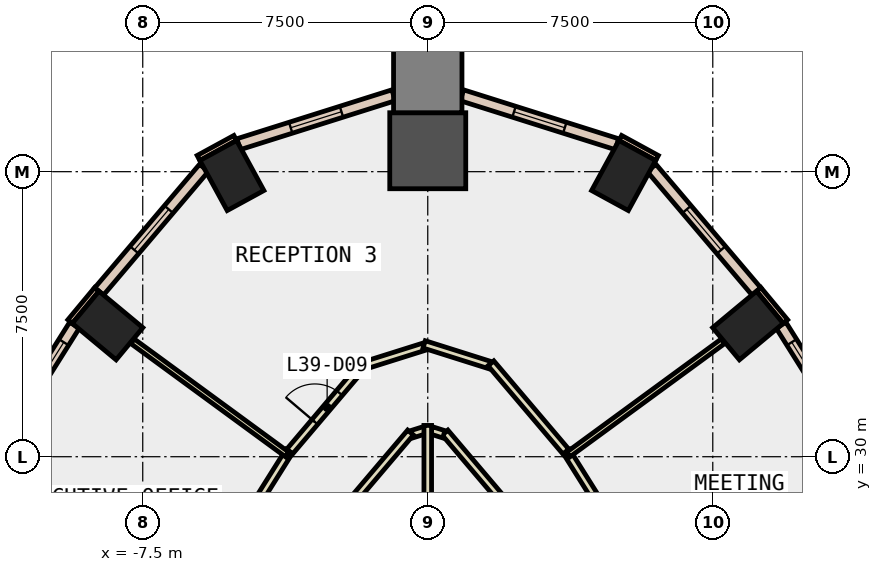
"""IFC4 building model, lengths in metres.
Left out: names, types, materials, properties, quantities, classifications, styles, units other than length and angle.
Written with IfcOpenShell. Run it as: python <this file> out.ifc"""

import sys

from ifc_helpers import new_model, si_unit, direction, frame, frame_2d, origin, origin_2d, place, context, subcontext, project, spatial, rectangle, extrude, element, fill, save


model = new_model("IFC4")
c1 = context("Model", 3, precision=1e-05, world=origin(), true_north=direction((0.0, 1.0)))
c2 = subcontext(c1, "Body", "Model", "MODEL_VIEW")
j1 = project(units=[si_unit("LENGTHUNIT", "METRE"), si_unit("PLANEANGLEUNIT", "RADIAN")], contexts=[c1])
p1 = place(None, origin())
s1 = spatial("IfcSite", under=j1, at=p1, CompositionType="ELEMENT")
p2 = place(p1, origin())
s2 = spatial("IfcBuilding", under=s1, at=p2, CompositionType="ELEMENT")
p3 = place(p2, frame((0.0, 0.0, 176.0)))
s3 = spatial("IfcBuildingStorey", under=s2, at=p3, CompositionType="ELEMENT", Elevation=176.0)
for number, where, z_axis, x_axis in (
    (1, (8.426, 33.452, -0.4), (0.0, 0.0, 1.0), (-0.639, 0.769, 0.0)),
    (2, (5.154, 37.399, -0.4), (0.0, 0.0, 1.0), (-0.878, 0.479, 0.0)),
):
    element("IfcColumn", number, at=place(p3, frame(where, z_axis=z_axis, x_axis=x_axis)), inside=s3, PredefinedType="COLUMN", context=c2, shape_type="SweptSolid", body=[
        extrude(rectangle(XDim=1.1, YDim=1.5, at=origin_2d()), origin(), (0.0, 0.0, 1.0), 4.2),
    ])
p4 = place(p3, frame((0.0, 38.051, -0.4), z_axis=(0.0, 0.0, 1.0), x_axis=(0.0, 1.0, 0.0)))
e3 = element("IfcColumn", 3, at=p4, inside=s3, PredefinedType="COLUMN", context=c2, shape_type="SweptSolid", body=[
    extrude(rectangle(XDim=2.0, YDim=2.0, at=origin_2d()), origin(), (0.0, 0.0, 1.0), 4.2),
])
for number, where, z_axis, x_axis in (
    (4, (-5.154, 37.399, -0.4), (0.0, 0.0, 1.0), (0.878, 0.479, 0.0)),
    (5, (-8.426, 33.452, -0.4), (0.0, 0.0, 1.0), (0.639, 0.769, 0.0)),
):
    element("IfcColumn", number, at=place(p3, frame(where, z_axis=z_axis, x_axis=x_axis)), inside=s3, PredefinedType="COLUMN", context=c2, shape_type="SweptSolid", body=[
        extrude(rectangle(XDim=1.1, YDim=1.5, at=origin_2d()), origin(), (0.0, 0.0, 1.0), 4.2),
    ])
p5 = place(p3, frame((0.0, 39.951, -0.4), z_axis=(0.0, 0.0, 1.0), x_axis=(0.0, 1.0, 0.0)))
e6 = element("IfcColumn", 6, at=p5, inside=s3, PredefinedType="COLUMN", context=c2, shape_type="SweptSolid", body=[
    extrude(rectangle(XDim=1.8, YDim=1.8, at=origin_2d()), origin(), (0.0, 0.0, 1.0), 4.2),
])
for number, where, z_axis, x_axis in (
    (7, (6.032, 37.86, 0.0), (0.0, 0.0, 1.0), (-0.878, 0.479, 0.0)),
    (8, (-5.066, 38.387, 0.0), (0.0, 0.0, 1.0), (-0.878, -0.479, 0.0)),
):
    element("IfcWall", number, at=place(p3, frame(where, z_axis=z_axis, x_axis=x_axis)), inside=s3, PredefinedType="STANDARD", context=c2, shape_type="SweptSolid", body=[
        extrude(rectangle(XDim=1.1, YDim=0.15, at=frame_2d((0.55, 0.0))), origin(), (0.0, 0.0, 1.0), 3.8),
    ])
for number, where, z_axis, x_axis in (
    (9, (9.412, 33.556, 0.0), (0.0, 0.0, 1.0), (-0.639, 0.769, 0.0)),
    (10, (-8.709, 34.402, 0.0), (0.0, 0.0, 1.0), (-0.639, -0.769, 0.0)),
):
    element("IfcWall", number, at=place(p3, frame(where, z_axis=z_axis, x_axis=x_axis)), inside=s3, PredefinedType="STANDARD", context=c2, shape_type="SweptSolid", body=[
        extrude(rectangle(XDim=1.1, YDim=0.15, at=frame_2d((0.55, 0.0))), origin(), (0.0, 0.0, 1.0), 3.8),
    ])
p6 = place(p3, frame((12.55, 28.279, 0.0), z_axis=(0.0, 0.0, 1.0), x_axis=(-0.531816047834, 0.846859900613, 0.0)))
e11 = element("IfcWall", 11, at=p6, inside=s3, PredefinedType="STANDARD", context=c2, shape_type="SweptSolid", body=[
    extrude(rectangle(XDim=6.119, YDim=0.3, at=frame_2d((3.06, 0.0))), origin(), (0.0, 0.0, 1.0), 3.8),
])
p7 = place(p6, frame((0.53, 0.0, 0.9)))
e12 = element("IfcOpeningElement", 12, at=p7, cuts=e11, PredefinedType="OPENING", context=c2, shape_type="SweptSolid", body=[
    extrude(rectangle(XDim=2.0, YDim=2.6, at=frame_2d((1.0, 1.3))), frame((0.0, 0.16, 0.0), z_axis=(0.0, -1.0, 0.0), x_axis=(1.0, 0.0, 0.0)), (0.0, 0.0, 1.0), 0.32),
])
p8 = place(p6, frame((3.589, 0.0, 0.9)))
e13 = element("IfcOpeningElement", 13, at=p8, cuts=e11, PredefinedType="OPENING", context=c2, shape_type="SweptSolid", body=[
    extrude(rectangle(XDim=2.0, YDim=2.6, at=frame_2d((1.0, 1.3))), frame((0.0, 0.16, 0.0), z_axis=(0.0, -1.0, 0.0), x_axis=(1.0, 0.0, 0.0)), (0.0, 0.0, 1.0), 0.32),
])
p9 = place(p3, frame((8.647, 34.35, 0.0), z_axis=(0.0, 0.0, 1.0), x_axis=(-0.647156077277, 0.76235753531, 0.0)))
e14 = element("IfcWall", 14, at=p9, inside=s3, PredefinedType="STANDARD", context=c2, shape_type="SweptSolid", body=[
    extrude(rectangle(XDim=4.262, YDim=0.3, at=frame_2d((2.131, 0.0))), origin(), (0.0, 0.0, 1.0), 3.8),
])
p10 = place(p9, frame((1.431, 0.0, 0.9)))
e15 = element("IfcOpeningElement", 15, at=p10, cuts=e14, PredefinedType="OPENING", context=c2, shape_type="SweptSolid", body=[
    extrude(rectangle(XDim=1.4, YDim=2.6, at=frame_2d((0.7, 1.3))), frame((0.0, 0.16, 0.0), z_axis=(0.0, -1.0, 0.0), x_axis=(1.0, 0.0, 0.0)), (0.0, 0.0, 1.0), 0.32),
])
p11 = place(p3, frame((4.978, 38.223, 0.0), z_axis=(0.0, 0.0, 1.0), x_axis=(-0.953651650729, 0.300912826349, 0.0)))
e16 = element("IfcWall", 16, at=p11, inside=s3, PredefinedType="STANDARD", context=c2, shape_type="SweptSolid", body=[
    extrude(rectangle(XDim=4.277, YDim=0.3, at=frame_2d((2.139, 0.0))), origin(), (0.0, 0.0, 1.0), 3.8),
])
p12 = place(p11, frame((1.439, 0.0, 0.9)))
e17 = element("IfcOpeningElement", 17, at=p12, cuts=e16, PredefinedType="OPENING", context=c2, shape_type="SweptSolid", body=[
    extrude(rectangle(XDim=1.4, YDim=2.6, at=frame_2d((0.7, 1.3))), frame((0.0, 0.16, 0.0), z_axis=(0.0, -1.0, 0.0), x_axis=(1.0, 0.0, 0.0)), (0.0, 0.0, 1.0), 0.32),
])
p13 = place(p3, frame((-0.899, 39.51, 0.0), z_axis=(0.0, 0.0, 1.0), x_axis=(-0.953651650729, -0.300912826349, 0.0)))
e18 = element("IfcWall", 18, at=p13, inside=s3, PredefinedType="STANDARD", context=c2, shape_type="SweptSolid", body=[
    extrude(rectangle(XDim=4.277, YDim=0.3, at=frame_2d((2.139, 0.0))), origin(), (0.0, 0.0, 1.0), 3.8),
])
p14 = place(p13, frame((1.439, 0.0, 0.9)))
e19 = element("IfcOpeningElement", 19, at=p14, cuts=e18, PredefinedType="OPENING", context=c2, shape_type="SweptSolid", body=[
    extrude(rectangle(XDim=1.4, YDim=2.6, at=frame_2d((0.7, 1.3))), frame((0.0, 0.16, 0.0), z_axis=(0.0, -1.0, 0.0), x_axis=(1.0, 0.0, 0.0)), (0.0, 0.0, 1.0), 0.32),
])
p15 = place(p3, frame((-5.889, 37.599, 0.0), z_axis=(0.0, 0.0, 1.0), x_axis=(-0.647156077277, -0.76235753531, 0.0)))
e20 = element("IfcWall", 20, at=p15, inside=s3, PredefinedType="STANDARD", context=c2, shape_type="SweptSolid", body=[
    extrude(rectangle(XDim=4.262, YDim=0.3, at=frame_2d((2.131, 0.0))), origin(), (0.0, 0.0, 1.0), 3.8),
])
p16 = place(p15, frame((1.431, 0.0, 0.9)))
e21 = element("IfcOpeningElement", 21, at=p16, cuts=e20, PredefinedType="OPENING", context=c2, shape_type="SweptSolid", body=[
    extrude(rectangle(XDim=1.4, YDim=2.6, at=frame_2d((0.7, 1.3))), frame((0.0, 0.16, 0.0), z_axis=(0.0, -1.0, 0.0), x_axis=(1.0, 0.0, 0.0)), (0.0, 0.0, 1.0), 0.32),
])
p17 = place(p3, frame((-9.296, 33.461, 0.0), z_axis=(0.0, 0.0, 1.0), x_axis=(-0.531816047834, -0.846859900613, 0.0)))
e22 = element("IfcWall", 22, at=p17, inside=s3, PredefinedType="STANDARD", context=c2, shape_type="SweptSolid", body=[
    extrude(rectangle(XDim=6.119, YDim=0.3, at=frame_2d((3.06, 0.0))), origin(), (0.0, 0.0, 1.0), 3.8),
])
p18 = place(p17, frame((0.53, 0.0, 0.9)))
e23 = element("IfcOpeningElement", 23, at=p18, cuts=e22, PredefinedType="OPENING", context=c2, shape_type="SweptSolid", body=[
    extrude(rectangle(XDim=2.0, YDim=2.6, at=frame_2d((1.0, 1.3))), frame((0.0, 0.16, 0.0), z_axis=(0.0, -1.0, 0.0), x_axis=(1.0, 0.0, 0.0)), (0.0, 0.0, 1.0), 0.32),
])
p19 = place(p17, frame((3.589, 0.0, 0.9)))
e24 = element("IfcOpeningElement", 24, at=p19, cuts=e22, PredefinedType="OPENING", context=c2, shape_type="SweptSolid", body=[
    extrude(rectangle(XDim=2.0, YDim=2.6, at=frame_2d((1.0, 1.3))), frame((0.0, 0.16, 0.0), z_axis=(0.0, -1.0, 0.0), x_axis=(1.0, 0.0, 0.0)), (0.0, 0.0, 1.0), 0.32),
])
p20 = place(p3, frame((1.936, 28.89, 0.0), z_axis=(0.0, 0.0, 1.0), x_axis=(-0.647388540773, 0.762160138866, 0.0)))
e25 = element("IfcWall", 25, at=p20, inside=s3, PredefinedType="PARTITIONING", context=c2, shape_type="SweptSolid", body=[
    extrude(rectangle(XDim=2.291, YDim=0.2, at=frame_2d((1.146, 0.0))), origin(), (0.0, 0.0, 1.0), 3.75),
])
p21 = place(p3, frame((0.423, 30.59, 0.0), z_axis=(0.0, 0.0, 1.0), x_axis=(-0.954074901128, 0.29956816092, 0.0)))
e26 = element("IfcWall", 26, at=p21, inside=s3, PredefinedType="PARTITIONING", context=c2, shape_type="SweptSolid", body=[
    extrude(rectangle(XDim=0.344, YDim=0.2, at=frame_2d((0.172, 0.0))), origin(), (0.0, 0.0, 1.0), 3.75),
])
p22 = place(p3, frame((-0.048, 30.708, 0.0), z_axis=(0.0, 0.0, 1.0), x_axis=(-0.953948026088, -0.299971937891, 0.0)))
e27 = element("IfcWall", 27, at=p22, inside=s3, PredefinedType="PARTITIONING", context=c2, shape_type="SweptSolid", body=[
    extrude(rectangle(XDim=0.393, YDim=0.2, at=frame_2d((0.197, 0.0))), origin(), (0.0, 0.0, 1.0), 3.75),
])
p23 = place(p3, frame((-0.453, 30.636, 0.0), z_axis=(0.0, 0.0, 1.0), x_axis=(-0.647388540773, -0.762160138866, 0.0)))
e28 = element("IfcWall", 28, at=p23, inside=s3, PredefinedType="PARTITIONING", context=c2, shape_type="SweptSolid", body=[
    extrude(rectangle(XDim=2.291, YDim=0.2, at=frame_2d((1.146, 0.0))), origin(), (0.0, 0.0, 1.0), 3.75),
])
p24 = place(p3, frame((3.646, 30.142, 0.0), z_axis=(0.0, 0.0, 1.0), x_axis=(0.531621424046, -0.846982090422, 0.0)))
e29 = element("IfcWall", 29, at=p24, inside=s3, PredefinedType="PARTITIONING", context=c2, shape_type="SweptSolid", body=[
    extrude(rectangle(XDim=6.745, YDim=0.2, at=frame_2d((3.373, 0.0))), origin(), (0.0, 0.0, 1.0), 3.75),
])
p25 = place(p24, frame((2.948, 0.0, 0.0)))
e30 = element("IfcOpeningElement", 30, at=p25, cuts=e29, PredefinedType="OPENING", context=c2, shape_type="SweptSolid", body=[
    extrude(rectangle(XDim=1.0, YDim=2.1, at=frame_2d((0.5, 1.05))), frame((0.0, 0.11, 0.0), z_axis=(0.0, -1.0, 0.0), x_axis=(1.0, 0.0, 0.0)), (0.0, 0.0, 1.0), 0.22),
])
p26 = place(p3, frame((-3.634, 30.134, 0.0), z_axis=(0.0, 0.0, 1.0), x_axis=(0.647148242723, 0.762364185899, 0.0)))
e31 = element("IfcWall", 31, at=p26, inside=s3, PredefinedType="PARTITIONING", context=c2, shape_type="SweptSolid", body=[
    extrude(rectangle(XDim=3.047, YDim=0.2, at=frame_2d((1.523, 0.0))), origin(), (0.0, 0.0, 1.0), 3.75),
])
p27 = place(p26, frame((1.024, 0.0, 0.0)))
e32 = element("IfcOpeningElement", 32, at=p27, cuts=e31, PredefinedType="OPENING", context=c2, shape_type="SweptSolid", body=[
    extrude(rectangle(XDim=1.0, YDim=2.1, at=frame_2d((0.5, 1.05))), frame((0.0, 0.11, 0.0), z_axis=(0.0, -1.0, 0.0), x_axis=(1.0, 0.0, 0.0)), (0.0, 0.0, 1.0), 0.22),
])
p28 = place(p3, frame((-1.632, 32.411, 0.0), z_axis=(0.0, 0.0, 1.0), x_axis=(0.953809064266, 0.300413496575, 0.0)))
e33 = element("IfcWall", 33, at=p28, inside=s3, PredefinedType="PARTITIONING", context=c2, shape_type="SweptSolid", body=[
    extrude(rectangle(XDim=1.612, YDim=0.2, at=frame_2d((0.806, 0.0))), origin(), (0.0, 0.0, 1.0), 3.75),
])
p29 = place(p3, frame((-0.095, 32.956, 0.0), z_axis=(0.0, 0.0, 1.0), x_axis=(0.953617294109, -0.301021687552, 0.0)))
e34 = element("IfcWall", 34, at=p29, inside=s3, PredefinedType="PARTITIONING", context=c2, shape_type="SweptSolid", body=[
    extrude(rectangle(XDim=1.811, YDim=0.2, at=frame_2d((0.906, 0.0))), origin(), (0.0, 0.0, 1.0), 3.75),
])
p30 = place(p3, frame((1.662, 32.457, 0.0), z_axis=(0.0, 0.0, 1.0), x_axis=(0.647148242723, -0.762364185899, 0.0)))
e35 = element("IfcWall", 35, at=p30, inside=s3, PredefinedType="PARTITIONING", context=c2, shape_type="SweptSolid", body=[
    extrude(rectangle(XDim=3.047, YDim=0.2, at=frame_2d((1.523, 0.0))), origin(), (0.0, 0.0, 1.0), 3.75),
])
p31 = place(p3, frame((-7.312, 24.302, 0.0), z_axis=(0.0, 0.0, 1.0), x_axis=(0.53166241737, 0.846956358944, 0.0)))
e36 = element("IfcWall", 36, at=p31, inside=s3, PredefinedType="PARTITIONING", context=c2, shape_type="SweptSolid", body=[
    extrude(rectangle(XDim=6.895, YDim=0.2, at=frame_2d((3.448, 0.0))), origin(), (0.0, 0.0, 1.0), 3.75),
])
p32 = place(p31, frame((2.948, 0.0, 0.0)))
e37 = element("IfcOpeningElement", 37, at=p32, cuts=e36, PredefinedType="OPENING", context=c2, shape_type="SweptSolid", body=[
    extrude(rectangle(XDim=1.0, YDim=2.1, at=frame_2d((0.5, 1.05))), frame((0.0, 0.11, 0.0), z_axis=(0.0, -1.0, 0.0), x_axis=(1.0, 0.0, 0.0)), (0.0, 0.0, 1.0), 0.22),
])
p33 = place(p3, frame((0.0, 23.5, 0.0), z_axis=(0.0, 0.0, 1.0), x_axis=(0.0, 1.0, 0.0)))
e38 = element("IfcWall", 38, at=p33, inside=s3, PredefinedType="PARTITIONING", context=c2, shape_type="SweptSolid", body=[
    extrude(rectangle(XDim=7.323, YDim=0.2, at=frame_2d((3.662, 0.0))), origin(), (0.0, 0.0, 1.0), 3.75),
])
for number, where, z_axis, x_axis in (
    (39, (3.699, 30.058, 0.0), (0.0, 0.0, 1.0), (0.807, 0.591, 0.0)),
    (40, (-3.699, 30.058, 0.0), (0.0, 0.0, 1.0), (-0.807, 0.591, 0.0)),
):
    element("IfcWall", number, at=place(p3, frame(where, z_axis=z_axis, x_axis=x_axis)), inside=s3, PredefinedType="PARTITIONING", context=c2, shape_type="SweptSolid", body=[
        extrude(rectangle(XDim=5.044, YDim=0.15, at=frame_2d((2.522, 0.0))), origin(), (0.0, 0.0, 1.0), 3.75),
    ])
p34 = place(p8, origin())
e41 = element("IfcWindow", 41, at=p34, inside=s3, PartitioningType="SINGLE_PANEL", PredefinedType="WINDOW", context=c2, shape_type="SweptSolid", body=[
    extrude(rectangle(XDim=2.0, YDim=2.6, at=frame_2d((1.0, 1.3))), frame((0.0, 0.03, 0.0), z_axis=(0.0, -1.0, 0.0), x_axis=(1.0, 0.0, 0.0)), (0.0, 0.0, 1.0), 0.06),
])
fill(e13, e41)
p35 = place(p10, origin())
e42 = element("IfcWindow", 42, at=p35, inside=s3, PartitioningType="SINGLE_PANEL", PredefinedType="WINDOW", context=c2, shape_type="SweptSolid", body=[
    extrude(rectangle(XDim=1.4, YDim=2.6, at=frame_2d((0.7, 1.3))), frame((0.0, 0.03, 0.0), z_axis=(0.0, -1.0, 0.0), x_axis=(1.0, 0.0, 0.0)), (0.0, 0.0, 1.0), 0.06),
])
fill(e15, e42)
p36 = place(p12, origin())
e43 = element("IfcWindow", 43, at=p36, inside=s3, PartitioningType="SINGLE_PANEL", PredefinedType="WINDOW", context=c2, shape_type="SweptSolid", body=[
    extrude(rectangle(XDim=1.4, YDim=2.6, at=frame_2d((0.7, 1.3))), frame((0.0, 0.03, 0.0), z_axis=(0.0, -1.0, 0.0), x_axis=(1.0, 0.0, 0.0)), (0.0, 0.0, 1.0), 0.06),
])
fill(e17, e43)
p37 = place(p14, origin())
e44 = element("IfcWindow", 44, at=p37, inside=s3, PartitioningType="SINGLE_PANEL", PredefinedType="WINDOW", context=c2, shape_type="SweptSolid", body=[
    extrude(rectangle(XDim=1.4, YDim=2.6, at=frame_2d((0.7, 1.3))), frame((0.0, 0.03, 0.0), z_axis=(0.0, -1.0, 0.0), x_axis=(1.0, 0.0, 0.0)), (0.0, 0.0, 1.0), 0.06),
])
fill(e19, e44)
p38 = place(p16, origin())
e45 = element("IfcWindow", 45, at=p38, inside=s3, PartitioningType="SINGLE_PANEL", PredefinedType="WINDOW", context=c2, shape_type="SweptSolid", body=[
    extrude(rectangle(XDim=1.4, YDim=2.6, at=frame_2d((0.7, 1.3))), frame((0.0, 0.03, 0.0), z_axis=(0.0, -1.0, 0.0), x_axis=(1.0, 0.0, 0.0)), (0.0, 0.0, 1.0), 0.06),
])
fill(e21, e45)
p39 = place(p18, origin())
e46 = element("IfcWindow", 46, at=p39, inside=s3, PartitioningType="SINGLE_PANEL", PredefinedType="WINDOW", context=c2, shape_type="SweptSolid", body=[
    extrude(rectangle(XDim=2.0, YDim=2.6, at=frame_2d((1.0, 1.3))), frame((0.0, 0.03, 0.0), z_axis=(0.0, -1.0, 0.0), x_axis=(1.0, 0.0, 0.0)), (0.0, 0.0, 1.0), 0.06),
])
fill(e23, e46)
p40 = place(p27, origin())
e47 = element("IfcDoor", 47, at=p40, inside=s3, OperationType="SINGLE_SWING_LEFT", PredefinedType="DOOR", context=c2, shape_type="SweptSolid", body=[
    extrude(rectangle(XDim=1.0, YDim=2.1, at=frame_2d((0.5, 1.05))), frame((0.0, 0.025, 0.0), z_axis=(0.0, -1.0, 0.0), x_axis=(1.0, 0.0, 0.0)), (0.0, 0.0, 1.0), 0.05),
])
fill(e32, e47)
save(model, sys.argv[1])
